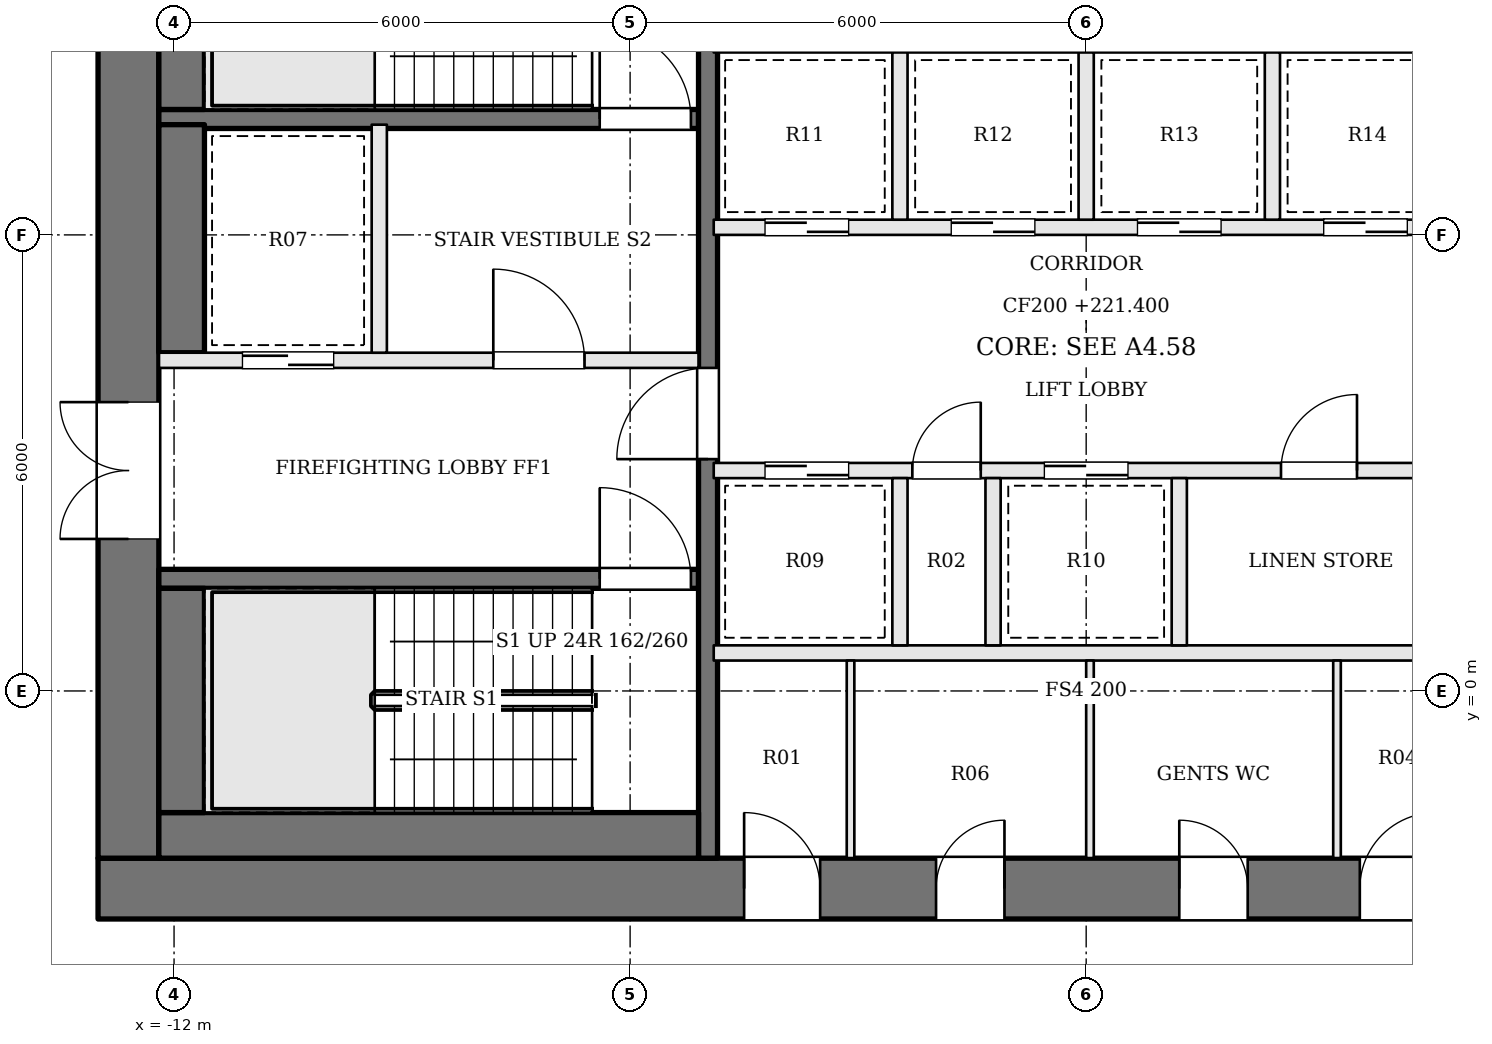
"""IFC4 building model, lengths in metres.
Left out: names, types, materials, properties, quantities, classifications, styles, units other than length and angle.
Written with IfcOpenShell. Run it as: python <this file> out.ifc"""

import sys

from ifc_helpers import new_model, si_unit, direction, frame, frame_2d, origin, place, context, subcontext, project, spatial, rectangle, extrude, element, fill, save


model = new_model("IFC4")
c1 = context("Model", 3, precision=1e-05, world=origin(), true_north=direction((0.0, 1.0)))
c2 = subcontext(c1, "Body", "Model", "MODEL_VIEW")
j1 = project(units=[si_unit("LENGTHUNIT", "METRE"), si_unit("PLANEANGLEUNIT", "RADIAN")], contexts=[c1])
p1 = place(None, origin())
s1 = spatial("IfcSite", under=j1, at=p1, CompositionType="ELEMENT")
p2 = place(p1, origin())
s2 = spatial("IfcBuilding", under=s1, at=p2, CompositionType="ELEMENT")
p3 = place(p2, frame((0.0, 0.0, 221.4)))
s3 = spatial("IfcBuildingStorey", under=s2, at=p3, CompositionType="ELEMENT", Elevation=221.4)
p4 = place(p3, frame((-13.0, -2.6, 0.0), z_axis=(0.0, 0.0, 1.0), x_axis=(1.0, 0.0, 0.0)))
e1 = element("IfcWall", 1, at=p4, inside=s3, PredefinedType="SHEAR", context=c2, shape_type="SweptSolid", body=[
    extrude(rectangle(XDim=26.0, YDim=0.8, at=frame_2d((13.0, 0.0))), origin(), (0.0, 0.0, 1.0), 3.9),
])
p5 = place(p4, frame((8.5, 0.0, 0.0)))
e2 = element("IfcOpeningElement", 2, at=p5, cuts=e1, PredefinedType="OPENING", context=c2, shape_type="SweptSolid", body=[
    extrude(rectangle(XDim=1.0, YDim=2.1, at=frame_2d((0.5, 1.05))), frame((0.0, 0.41, 0.0), z_axis=(0.0, -1.0, 0.0), x_axis=(1.0, 0.0, 0.0)), (0.0, 0.0, 1.0), 0.82),
])
p6 = place(p4, frame((11.025, 0.0, 0.0)))
e3 = element("IfcOpeningElement", 3, at=p6, cuts=e1, PredefinedType="OPENING", context=c2, shape_type="SweptSolid", body=[
    extrude(rectangle(XDim=0.9, YDim=2.1, at=frame_2d((0.45, 1.05))), frame((0.0, 0.41, 0.0), z_axis=(0.0, -1.0, 0.0), x_axis=(1.0, 0.0, 0.0)), (0.0, 0.0, 1.0), 0.82),
])
p7 = place(p4, frame((14.225, 0.0, 0.0)))
e4 = element("IfcOpeningElement", 4, at=p7, cuts=e1, PredefinedType="OPENING", context=c2, shape_type="SweptSolid", body=[
    extrude(rectangle(XDim=0.9, YDim=2.1, at=frame_2d((0.45, 1.05))), frame((0.0, 0.41, 0.0), z_axis=(0.0, -1.0, 0.0), x_axis=(1.0, 0.0, 0.0)), (0.0, 0.0, 1.0), 0.82),
])
p8 = place(p4, frame((16.6, 0.0, 0.0)))
e5 = element("IfcOpeningElement", 5, at=p8, cuts=e1, PredefinedType="OPENING", context=c2, shape_type="SweptSolid", body=[
    extrude(rectangle(XDim=1.0, YDim=2.1, at=frame_2d((0.5, 1.05))), frame((0.0, 0.41, 0.0), z_axis=(0.0, -1.0, 0.0), x_axis=(1.0, 0.0, 0.0)), (0.0, 0.0, 1.0), 0.82),
])
p9 = place(p3, frame((-12.6, -2.2, 0.0), z_axis=(0.0, 0.0, 1.0), x_axis=(0.0, 1.0, 0.0)))
e6 = element("IfcWall", 6, at=p9, inside=s3, PredefinedType="SHEAR", context=c2, shape_type="SweptSolid", body=[
    extrude(rectangle(XDim=13.4, YDim=0.8, at=frame_2d((6.7, 0.0))), origin(), (0.0, 0.0, 1.0), 3.9),
])
p10 = place(p9, frame((4.2, 0.0, 0.0)))
e7 = element("IfcOpeningElement", 7, at=p10, cuts=e6, PredefinedType="OPENING", context=c2, shape_type="SweptSolid", body=[
    extrude(rectangle(XDim=1.8, YDim=2.1, at=frame_2d((0.9, 1.05))), frame((0.0, 0.41, 0.0), z_axis=(0.0, -1.0, 0.0), x_axis=(1.0, 0.0, 0.0)), (0.0, 0.0, 1.0), 0.82),
])
p11 = place(p3, frame((-12.2, 1.475, 0.0), z_axis=(0.0, 0.0, 1.0), x_axis=(1.0, 0.0, 0.0)))
e8 = element("IfcWall", 8, at=p11, inside=s3, PredefinedType="SOLIDWALL", context=c2, shape_type="SweptSolid", body=[
    extrude(rectangle(XDim=7.1, YDim=0.25, at=frame_2d((3.55, 0.0))), origin(), (0.0, 0.0, 1.0), 3.7),
])
p12 = place(p11, frame((5.8, 0.0, 0.0)))
e9 = element("IfcOpeningElement", 9, at=p12, cuts=e8, PredefinedType="OPENING", context=c2, shape_type="SweptSolid", body=[
    extrude(rectangle(XDim=1.2, YDim=2.1, at=frame_2d((0.6, 1.05))), frame((0.0, 0.135, 0.0), z_axis=(0.0, -1.0, 0.0), x_axis=(1.0, 0.0, 0.0)), (0.0, 0.0, 1.0), 0.27),
])
p13 = place(p3, frame((-12.2, 4.35, 0.0), z_axis=(0.0, 0.0, 1.0), x_axis=(1.0, 0.0, 0.0)))
e10 = element("IfcWall", 10, at=p13, inside=s3, PredefinedType="SOLIDWALL", context=c2, shape_type="SweptSolid", body=[
    extrude(rectangle(XDim=7.1, YDim=0.2, at=frame_2d((3.55, 0.0))), origin(), (0.0, 0.0, 1.0), 3.7),
])
p14 = place(p13, frame((4.4, 0.0, 0.0)))
e11 = element("IfcOpeningElement", 11, at=p14, cuts=e10, PredefinedType="OPENING", context=c2, shape_type="SweptSolid", body=[
    extrude(rectangle(XDim=1.2, YDim=2.1, at=frame_2d((0.6, 1.05))), frame((0.0, 0.11, 0.0), z_axis=(0.0, -1.0, 0.0), x_axis=(1.0, 0.0, 0.0)), (0.0, 0.0, 1.0), 0.22),
])
p15 = place(p13, frame((1.1, 0.0, 0.0)))
e12 = element("IfcOpeningElement", 12, at=p15, cuts=e10, PredefinedType="OPENING", context=c2, shape_type="SweptSolid", body=[
    extrude(rectangle(XDim=1.2, YDim=2.1, at=frame_2d((0.6, 1.05))), frame((0.0, 0.11, 0.0), z_axis=(0.0, -1.0, 0.0), x_axis=(1.0, 0.0, 0.0)), (0.0, 0.0, 1.0), 0.22),
])
p16 = place(p3, frame((-12.2, 7.525, 0.0), z_axis=(0.0, 0.0, 1.0), x_axis=(1.0, 0.0, 0.0)))
e13 = element("IfcWall", 13, at=p16, inside=s3, PredefinedType="SOLIDWALL", context=c2, shape_type="SweptSolid", body=[
    extrude(rectangle(XDim=7.1, YDim=0.25, at=frame_2d((3.55, 0.0))), origin(), (0.0, 0.0, 1.0), 3.7),
])
p17 = place(p16, frame((5.8, 0.0, 0.0)))
e14 = element("IfcOpeningElement", 14, at=p17, cuts=e13, PredefinedType="OPENING", context=c2, shape_type="SweptSolid", body=[
    extrude(rectangle(XDim=1.2, YDim=2.1, at=frame_2d((0.6, 1.05))), frame((0.0, 0.135, 0.0), z_axis=(0.0, -1.0, 0.0), x_axis=(1.0, 0.0, 0.0)), (0.0, 0.0, 1.0), 0.27),
])
p18 = place(p3, frame((-9.3, 4.45, 0.0), z_axis=(0.0, 0.0, 1.0), x_axis=(0.0, 1.0, 0.0)))
e15 = element("IfcWall", 15, at=p18, inside=s3, PredefinedType="SOLIDWALL", context=c2, shape_type="SweptSolid", body=[
    extrude(rectangle(XDim=3.0, YDim=0.2, at=frame_2d((1.5, 0.0))), origin(), (0.0, 0.0, 1.0), 3.7),
])
p19 = place(p3, frame((-4.975, -2.2, 0.0), z_axis=(0.0, 0.0, 1.0), x_axis=(0.0, 1.0, 0.0)))
e16 = element("IfcWall", 16, at=p19, inside=s3, PredefinedType="SOLIDWALL", context=c2, shape_type="SweptSolid", body=[
    extrude(rectangle(XDim=13.4, YDim=0.25, at=frame_2d((6.7, 0.0))), origin(), (0.0, 0.0, 1.0), 3.7),
])
p20 = place(p19, frame((5.25, 0.0, 0.0)))
e17 = element("IfcOpeningElement", 17, at=p20, cuts=e16, PredefinedType="OPENING", context=c2, shape_type="SweptSolid", body=[
    extrude(rectangle(XDim=1.2, YDim=2.1, at=frame_2d((0.6, 1.05))), frame((0.0, 0.135, 0.0), z_axis=(0.0, -1.0, 0.0), x_axis=(1.0, 0.0, 0.0)), (0.0, 0.0, 1.0), 0.27),
])
p21 = place(p3, frame((-12.2, -1.9, 0.0), z_axis=(0.0, 0.0, 1.0), x_axis=(1.0, 0.0, 0.0)))
e18 = element("IfcWall", 18, at=p21, inside=s3, PredefinedType="SOLIDWALL", context=c2, shape_type="SweptSolid", body=[
    extrude(rectangle(XDim=7.1, YDim=0.6, at=frame_2d((3.55, 0.0))), origin(), (0.0, 0.0, 1.0), 3.7),
])
p22 = place(p3, frame((-11.9, -1.6, 0.0), z_axis=(0.0, 0.0, 1.0), x_axis=(0.0, 1.0, 0.0)))
e19 = element("IfcWall", 19, at=p22, inside=s3, PredefinedType="SOLIDWALL", context=c2, shape_type="SweptSolid", body=[
    extrude(rectangle(XDim=2.95, YDim=0.6, at=frame_2d((1.475, 0.0))), origin(), (0.0, 0.0, 1.0), 3.7),
])
p23 = place(p3, frame((-11.9, 4.45, 0.0), z_axis=(0.0, 0.0, 1.0), x_axis=(0.0, 1.0, 0.0)))
e20 = element("IfcWall", 20, at=p23, inside=s3, PredefinedType="SOLIDWALL", context=c2, shape_type="SweptSolid", body=[
    extrude(rectangle(XDim=3.0, YDim=0.6, at=frame_2d((1.5, 0.0))), origin(), (0.0, 0.0, 1.0), 3.7),
])
p24 = place(p3, frame((-11.9, 7.65, 0.0), z_axis=(0.0, 0.0, 1.0), x_axis=(0.0, 1.0, 0.0)))
e21 = element("IfcWall", 21, at=p24, inside=s3, PredefinedType="SOLIDWALL", context=c2, shape_type="SweptSolid", body=[
    extrude(rectangle(XDim=2.95, YDim=0.6, at=frame_2d((1.475, 0.0))), origin(), (0.0, 0.0, 1.0), 3.7),
])
p25 = place(p3, frame((-4.9, 0.5, 0.0), z_axis=(0.0, 0.0, 1.0), x_axis=(1.0, 0.0, 0.0)))
e22 = element("IfcWall", 22, at=p25, inside=s3, PredefinedType="SOLIDWALL", context=c2, shape_type="SweptSolid", body=[
    extrude(rectangle(XDim=9.8, YDim=0.2, at=frame_2d((4.9, 0.0))), origin(), (0.0, 0.0, 1.0), 3.7),
])
p26 = place(p3, frame((-4.9, 2.9, 0.0), z_axis=(0.0, 0.0, 1.0), x_axis=(1.0, 0.0, 0.0)))
e23 = element("IfcWall", 23, at=p26, inside=s3, PredefinedType="SOLIDWALL", context=c2, shape_type="SweptSolid", body=[
    extrude(rectangle(XDim=9.8, YDim=0.2, at=frame_2d((4.9, 0.0))), origin(), (0.0, 0.0, 1.0), 3.7),
])
p27 = place(p26, frame((0.675, 0.0, 0.0)))
e24 = element("IfcOpeningElement", 24, at=p27, cuts=e23, PredefinedType="OPENING", context=c2, shape_type="SweptSolid", body=[
    extrude(rectangle(XDim=1.1, YDim=2.1, at=frame_2d((0.55, 1.05))), frame((0.0, 0.11, 0.0), z_axis=(0.0, -1.0, 0.0), x_axis=(1.0, 0.0, 0.0)), (0.0, 0.0, 1.0), 0.22),
])
p28 = place(p26, frame((2.613, 0.0, 0.0)))
e25 = element("IfcOpeningElement", 25, at=p28, cuts=e23, PredefinedType="OPENING", context=c2, shape_type="SweptSolid", body=[
    extrude(rectangle(XDim=0.9, YDim=2.1, at=frame_2d((0.45, 1.05))), frame((0.0, 0.11, 0.0), z_axis=(0.0, -1.0, 0.0), x_axis=(1.0, 0.0, 0.0)), (0.0, 0.0, 1.0), 0.22),
])
p29 = place(p26, frame((4.35, 0.0, 0.0)))
e26 = element("IfcOpeningElement", 26, at=p29, cuts=e23, PredefinedType="OPENING", context=c2, shape_type="SweptSolid", body=[
    extrude(rectangle(XDim=1.1, YDim=2.1, at=frame_2d((0.55, 1.05))), frame((0.0, 0.11, 0.0), z_axis=(0.0, -1.0, 0.0), x_axis=(1.0, 0.0, 0.0)), (0.0, 0.0, 1.0), 0.22),
])
p30 = place(p26, frame((7.463, 0.0, 0.0)))
e27 = element("IfcOpeningElement", 27, at=p30, cuts=e23, PredefinedType="OPENING", context=c2, shape_type="SweptSolid", body=[
    extrude(rectangle(XDim=1.0, YDim=2.1, at=frame_2d((0.5, 1.05))), frame((0.0, 0.11, 0.0), z_axis=(0.0, -1.0, 0.0), x_axis=(1.0, 0.0, 0.0)), (0.0, 0.0, 1.0), 0.22),
])
p31 = place(p3, frame((-4.9, 6.1, 0.0), z_axis=(0.0, 0.0, 1.0), x_axis=(1.0, 0.0, 0.0)))
e28 = element("IfcWall", 28, at=p31, inside=s3, PredefinedType="SOLIDWALL", context=c2, shape_type="SweptSolid", body=[
    extrude(rectangle(XDim=9.8, YDim=0.2, at=frame_2d((4.9, 0.0))), origin(), (0.0, 0.0, 1.0), 3.7),
])
p32 = place(p31, frame((0.675, 0.0, 0.0)))
e29 = element("IfcOpeningElement", 29, at=p32, cuts=e28, PredefinedType="OPENING", context=c2, shape_type="SweptSolid", body=[
    extrude(rectangle(XDim=1.1, YDim=2.1, at=frame_2d((0.55, 1.05))), frame((0.0, 0.11, 0.0), z_axis=(0.0, -1.0, 0.0), x_axis=(1.0, 0.0, 0.0)), (0.0, 0.0, 1.0), 0.22),
])
p33 = place(p31, frame((3.125, 0.0, 0.0)))
e30 = element("IfcOpeningElement", 30, at=p33, cuts=e28, PredefinedType="OPENING", context=c2, shape_type="SweptSolid", body=[
    extrude(rectangle(XDim=1.1, YDim=2.1, at=frame_2d((0.55, 1.05))), frame((0.0, 0.11, 0.0), z_axis=(0.0, -1.0, 0.0), x_axis=(1.0, 0.0, 0.0)), (0.0, 0.0, 1.0), 0.22),
])
p34 = place(p31, frame((5.575, 0.0, 0.0)))
e31 = element("IfcOpeningElement", 31, at=p34, cuts=e28, PredefinedType="OPENING", context=c2, shape_type="SweptSolid", body=[
    extrude(rectangle(XDim=1.1, YDim=2.1, at=frame_2d((0.55, 1.05))), frame((0.0, 0.11, 0.0), z_axis=(0.0, -1.0, 0.0), x_axis=(1.0, 0.0, 0.0)), (0.0, 0.0, 1.0), 0.22),
])
p35 = place(p31, frame((8.025, 0.0, 0.0)))
e32 = element("IfcOpeningElement", 32, at=p35, cuts=e28, PredefinedType="OPENING", context=c2, shape_type="SweptSolid", body=[
    extrude(rectangle(XDim=1.1, YDim=2.1, at=frame_2d((0.55, 1.05))), frame((0.0, 0.11, 0.0), z_axis=(0.0, -1.0, 0.0), x_axis=(1.0, 0.0, 0.0)), (0.0, 0.0, 1.0), 0.22),
])
for number, where, z_axis, x_axis in (
    (33, (-2.45, 0.6, 0.0), (0.0, 0.0, 1.0), (0.0, 1.0, 0.0)),
    (34, (-1.225, 0.6, 0.0), (0.0, 0.0, 1.0), (0.0, 1.0, 0.0)),
    (35, (1.225, 0.6, 0.0), (0.0, 0.0, 1.0), (0.0, 1.0, 0.0)),
    (36, (-2.45, 6.2, 0.0), (0.0, 0.0, 1.0), (0.0, 1.0, 0.0)),
    (37, (0.0, 6.2, 0.0), (0.0, 0.0, 1.0), (0.0, 1.0, 0.0)),
    (38, (2.45, 6.2, 0.0), (0.0, 0.0, 1.0), (0.0, 1.0, 0.0)),
):
    element("IfcWall", number, at=place(p3, frame(where, z_axis=z_axis, x_axis=x_axis)), inside=s3, PredefinedType="SOLIDWALL", context=c2, shape_type="SweptSolid", body=[
        extrude(rectangle(XDim=2.2, YDim=0.2, at=frame_2d((1.1, 0.0))), origin(), (0.0, 0.0, 1.0), 3.7),
    ])
for number, where, z_axis, x_axis in (
    (39, (-3.1, -2.2, 0.0), (0.0, 0.0, 1.0), (0.0, 1.0, 0.0)),
    (40, (0.05, -2.2, 0.0), (0.0, 0.0, 1.0), (0.0, 1.0, 0.0)),
    (41, (3.3, -2.2, 0.0), (0.0, 0.0, 1.0), (0.0, 1.0, 0.0)),
):
    element("IfcWall", number, at=place(p3, frame(where, z_axis=z_axis, x_axis=x_axis)), inside=s3, PredefinedType="PARTITIONING", context=c2, shape_type="SweptSolid", body=[
        extrude(rectangle(XDim=2.6, YDim=0.1, at=frame_2d((1.3, 0.0))), origin(), (0.0, 0.0, 1.0), 3.7),
    ])
p36 = place(p10, origin())
e42 = element("IfcDoor", 42, at=p36, inside=s3, OperationType="DOUBLE_DOOR_SINGLE_SWING", PredefinedType="DOOR", context=c2, shape_type="SweptSolid", body=[
    extrude(rectangle(XDim=1.8, YDim=2.1, at=frame_2d((0.9, 1.05))), frame((0.0, 0.025, 0.0), z_axis=(0.0, -1.0, 0.0), x_axis=(1.0, 0.0, 0.0)), (0.0, 0.0, 1.0), 0.05),
])
fill(e7, e42)
p37 = place(p20, origin())
e43 = element("IfcDoor", 43, at=p37, inside=s3, OperationType="SINGLE_SWING_LEFT", PredefinedType="DOOR", context=c2, shape_type="SweptSolid", body=[
    extrude(rectangle(XDim=1.2, YDim=2.1, at=frame_2d((0.6, 1.05))), frame((0.0, 0.025, 0.0), z_axis=(0.0, -1.0, 0.0), x_axis=(1.0, 0.0, 0.0)), (0.0, 0.0, 1.0), 0.05),
])
fill(e17, e43)
p38 = place(p14, origin())
e44 = element("IfcDoor", 44, at=p38, inside=s3, OperationType="SINGLE_SWING_LEFT", PredefinedType="DOOR", context=c2, shape_type="SweptSolid", body=[
    extrude(rectangle(XDim=1.2, YDim=2.1, at=frame_2d((0.6, 1.05))), frame((0.0, 0.025, 0.0), z_axis=(0.0, -1.0, 0.0), x_axis=(1.0, 0.0, 0.0)), (0.0, 0.0, 1.0), 0.05),
])
fill(e11, e44)
p39 = place(p12, origin())
e45 = element("IfcDoor", 45, at=p39, inside=s3, OperationType="SINGLE_SWING_LEFT", PredefinedType="DOOR", context=c2, shape_type="SweptSolid", body=[
    extrude(rectangle(XDim=1.2, YDim=2.1, at=frame_2d((0.6, 1.05))), frame((0.0, 0.025, 0.0), z_axis=(0.0, -1.0, 0.0), x_axis=(1.0, 0.0, 0.0)), (0.0, 0.0, 1.0), 0.05),
])
fill(e9, e45)
p40 = place(p17, origin())
e46 = element("IfcDoor", 46, at=p40, inside=s3, OperationType="SINGLE_SWING_LEFT", PredefinedType="DOOR", context=c2, shape_type="SweptSolid", body=[
    extrude(rectangle(XDim=1.2, YDim=2.1, at=frame_2d((0.6, 1.05))), frame((0.0, 0.025, 0.0), z_axis=(0.0, -1.0, 0.0), x_axis=(1.0, 0.0, 0.0)), (0.0, 0.0, 1.0), 0.05),
])
fill(e14, e46)
p41 = place(p15, origin())
e47 = element("IfcDoor", 47, at=p41, inside=s3, OperationType="SLIDING_TO_RIGHT", PredefinedType="DOOR", context=c2, shape_type="SweptSolid", body=[
    extrude(rectangle(XDim=1.2, YDim=2.1, at=frame_2d((0.6, 1.05))), frame((0.0, 0.025, 0.0), z_axis=(0.0, -1.0, 0.0), x_axis=(1.0, 0.0, 0.0)), (0.0, 0.0, 1.0), 0.05),
])
fill(e12, e47)
p42 = place(p27, origin())
e48 = element("IfcDoor", 48, at=p42, inside=s3, OperationType="SLIDING_TO_RIGHT", PredefinedType="DOOR", context=c2, shape_type="SweptSolid", body=[
    extrude(rectangle(XDim=1.1, YDim=2.1, at=frame_2d((0.55, 1.05))), frame((0.0, 0.025, 0.0), z_axis=(0.0, -1.0, 0.0), x_axis=(1.0, 0.0, 0.0)), (0.0, 0.0, 1.0), 0.05),
])
fill(e24, e48)
p43 = place(p28, origin())
e49 = element("IfcDoor", 49, at=p43, inside=s3, OperationType="SINGLE_SWING_RIGHT", PredefinedType="DOOR", context=c2, shape_type="SweptSolid", body=[
    extrude(rectangle(XDim=0.9, YDim=2.1, at=frame_2d((0.45, 1.05))), frame((0.0, 0.025, 0.0), z_axis=(0.0, -1.0, 0.0), x_axis=(1.0, 0.0, 0.0)), (0.0, 0.0, 1.0), 0.05),
])
fill(e25, e49)
p44 = place(p29, origin())
e50 = element("IfcDoor", 50, at=p44, inside=s3, OperationType="SLIDING_TO_LEFT", PredefinedType="DOOR", context=c2, shape_type="SweptSolid", body=[
    extrude(rectangle(XDim=1.1, YDim=2.1, at=frame_2d((0.55, 1.05))), frame((0.0, 0.025, 0.0), z_axis=(0.0, -1.0, 0.0), x_axis=(1.0, 0.0, 0.0)), (0.0, 0.0, 1.0), 0.05),
])
fill(e26, e50)
p45 = place(p30, origin())
e51 = element("IfcDoor", 51, at=p45, inside=s3, OperationType="SINGLE_SWING_RIGHT", PredefinedType="DOOR", context=c2, shape_type="SweptSolid", body=[
    extrude(rectangle(XDim=1.0, YDim=2.1, at=frame_2d((0.5, 1.05))), frame((0.0, 0.025, 0.0), z_axis=(0.0, -1.0, 0.0), x_axis=(1.0, 0.0, 0.0)), (0.0, 0.0, 1.0), 0.05),
])
fill(e27, e51)
p46 = place(p32, origin())
e52 = element("IfcDoor", 52, at=p46, inside=s3, OperationType="SLIDING_TO_RIGHT", PredefinedType="DOOR", context=c2, shape_type="SweptSolid", body=[
    extrude(rectangle(XDim=1.1, YDim=2.1, at=frame_2d((0.55, 1.05))), frame((0.0, 0.025, 0.0), z_axis=(0.0, -1.0, 0.0), x_axis=(1.0, 0.0, 0.0)), (0.0, 0.0, 1.0), 0.05),
])
fill(e29, e52)
p47 = place(p33, origin())
e53 = element("IfcDoor", 53, at=p47, inside=s3, OperationType="SLIDING_TO_LEFT", PredefinedType="DOOR", context=c2, shape_type="SweptSolid", body=[
    extrude(rectangle(XDim=1.1, YDim=2.1, at=frame_2d((0.55, 1.05))), frame((0.0, 0.025, 0.0), z_axis=(0.0, -1.0, 0.0), x_axis=(1.0, 0.0, 0.0)), (0.0, 0.0, 1.0), 0.05),
])
fill(e30, e53)
p48 = place(p34, origin())
e54 = element("IfcDoor", 54, at=p48, inside=s3, OperationType="SLIDING_TO_RIGHT", PredefinedType="DOOR", context=c2, shape_type="SweptSolid", body=[
    extrude(rectangle(XDim=1.1, YDim=2.1, at=frame_2d((0.55, 1.05))), frame((0.0, 0.025, 0.0), z_axis=(0.0, -1.0, 0.0), x_axis=(1.0, 0.0, 0.0)), (0.0, 0.0, 1.0), 0.05),
])
fill(e31, e54)
p49 = place(p35, origin())
e55 = element("IfcDoor", 55, at=p49, inside=s3, OperationType="SLIDING_TO_LEFT", PredefinedType="DOOR", context=c2, shape_type="SweptSolid", body=[
    extrude(rectangle(XDim=1.1, YDim=2.1, at=frame_2d((0.55, 1.05))), frame((0.0, 0.025, 0.0), z_axis=(0.0, -1.0, 0.0), x_axis=(1.0, 0.0, 0.0)), (0.0, 0.0, 1.0), 0.05),
])
fill(e32, e55)
p50 = place(p5, origin())
e56 = element("IfcDoor", 56, at=p50, inside=s3, OperationType="SINGLE_SWING_LEFT", PredefinedType="DOOR", context=c2, shape_type="SweptSolid", body=[
    extrude(rectangle(XDim=1.0, YDim=2.1, at=frame_2d((0.5, 1.05))), frame((0.0, 0.025, 0.0), z_axis=(0.0, -1.0, 0.0), x_axis=(1.0, 0.0, 0.0)), (0.0, 0.0, 1.0), 0.05),
])
fill(e2, e56)
p51 = place(p6, origin())
e57 = element("IfcDoor", 57, at=p51, inside=s3, OperationType="SINGLE_SWING_RIGHT", PredefinedType="DOOR", context=c2, shape_type="SweptSolid", body=[
    extrude(rectangle(XDim=0.9, YDim=2.1, at=frame_2d((0.45, 1.05))), frame((0.0, 0.025, 0.0), z_axis=(0.0, -1.0, 0.0), x_axis=(1.0, 0.0, 0.0)), (0.0, 0.0, 1.0), 0.05),
])
fill(e3, e57)
p52 = place(p7, origin())
e58 = element("IfcDoor", 58, at=p52, inside=s3, OperationType="SINGLE_SWING_LEFT", PredefinedType="DOOR", context=c2, shape_type="SweptSolid", body=[
    extrude(rectangle(XDim=0.9, YDim=2.1, at=frame_2d((0.45, 1.05))), frame((0.0, 0.025, 0.0), z_axis=(0.0, -1.0, 0.0), x_axis=(1.0, 0.0, 0.0)), (0.0, 0.0, 1.0), 0.05),
])
fill(e4, e58)
p53 = place(p8, origin())
e59 = element("IfcDoor", 59, at=p53, inside=s3, OperationType="SINGLE_SWING_RIGHT", PredefinedType="DOOR", context=c2, shape_type="SweptSolid", body=[
    extrude(rectangle(XDim=1.0, YDim=2.1, at=frame_2d((0.5, 1.05))), frame((0.0, 0.025, 0.0), z_axis=(0.0, -1.0, 0.0), x_axis=(1.0, 0.0, 0.0)), (0.0, 0.0, 1.0), 0.05),
])
fill(e5, e59)
save(model, sys.argv[1])
